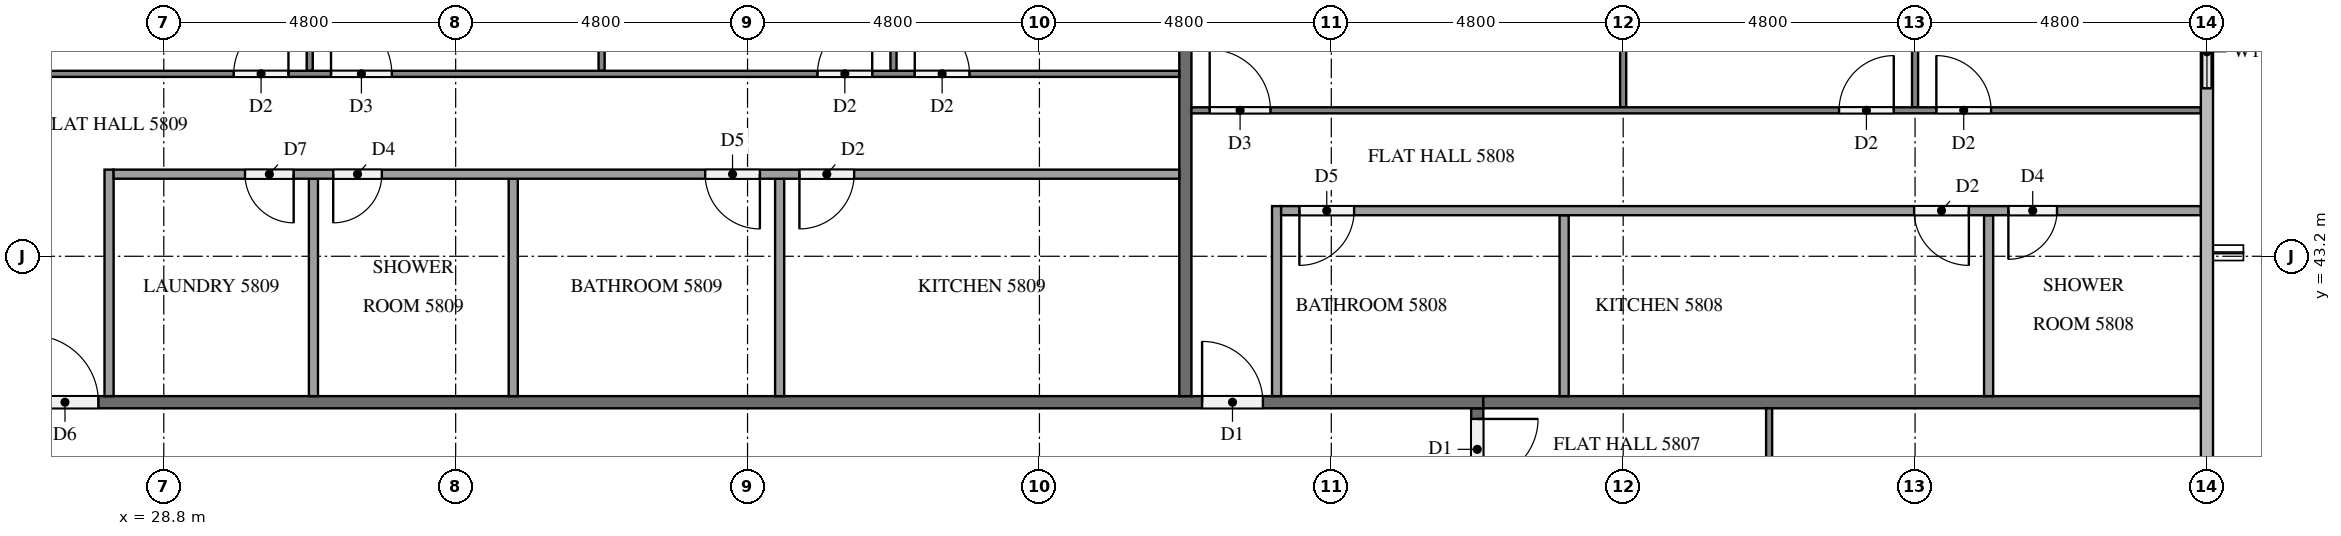
"""IFC4 building model, lengths in metres.
Left out: names, types, materials, properties, quantities, classifications, styles, units other than length and angle.
Written with IfcOpenShell. Run it as: python <this file> out.ifc"""

import sys

from ifc_helpers import new_model, si_unit, direction, frame, frame_2d, origin, place, context, subcontext, project, spatial, rectangle, extrude, element, fill, save


model = new_model("IFC4")
c1 = context("Model", 3, precision=1e-05, world=origin(), true_north=direction((0.0, 1.0)))
c2 = subcontext(c1, "Body", "Model", "MODEL_VIEW")
j1 = project(units=[si_unit("LENGTHUNIT", "METRE"), si_unit("PLANEANGLEUNIT", "RADIAN")], contexts=[c1])
p1 = place(None, origin())
s1 = spatial("IfcSite", under=j1, at=p1, CompositionType="ELEMENT")
p2 = place(p1, origin())
s2 = spatial("IfcBuilding", under=s1, at=p2, CompositionType="ELEMENT")
p3 = place(p2, frame((0.0, 0.0, 222.8)))
s3 = spatial("IfcBuildingStorey", under=s2, at=p3, CompositionType="ELEMENT", Elevation=222.8)
p4 = place(p3, frame((62.4, 45.6, 0.0), z_axis=(0.0, 0.0, 1.0), x_axis=(0.0, 1.0, 0.0)))
e1 = element("IfcWall", 1, at=p4, inside=s3, PredefinedType="SOLIDWALL", context=c2, shape_type="SweptSolid", body=[
    extrude(rectangle(XDim=1.925, YDim=0.15, at=frame_2d((0.962, 0.0))), origin(), (0.0, 0.0, 1.0), 3.2),
])
p5 = place(p4, frame((0.363, 0.0, 0.9)))
e2 = element("IfcOpeningElement", 2, at=p5, cuts=e1, PredefinedType="OPENING", context=c2, shape_type="SweptSolid", body=[
    extrude(rectangle(XDim=1.2, YDim=1.4, at=frame_2d((0.6, 0.7))), frame((0.0, 0.085, 0.0), z_axis=(0.0, -1.0, 0.0), x_axis=(1.0, 0.0, 0.0)), (0.0, 0.0, 1.0), 0.17),
])
p6 = place(p3, frame((50.4, 40.7, 0.0), z_axis=(0.0, 0.0, 1.0), x_axis=(0.0, -1.0, 0.0)))
e3 = element("IfcWall", 3, at=p6, inside=s3, PredefinedType="PARTITIONING", context=c2, shape_type="SweptSolid", body=[
    extrude(rectangle(XDim=28.6, YDim=0.2, at=frame_2d((14.3, 0.0))), origin(), (0.0, 0.0, 1.0), 3.2),
])
p7 = place(p6, frame((21.775, 0.0, 0.0)))
e4 = element("IfcOpeningElement", 4, at=p7, cuts=e3, PredefinedType="OPENING", context=c2, shape_type="SweptSolid", body=[
    extrude(rectangle(XDim=1.0, YDim=2.1, at=frame_2d((0.5, 1.05))), frame((0.0, 0.11, 0.0), z_axis=(0.0, -1.0, 0.0), x_axis=(1.0, 0.0, 0.0)), (0.0, 0.0, 1.0), 0.22),
])
p8 = place(p6, frame((7.375, 0.0, 0.0)))
e5 = element("IfcOpeningElement", 5, at=p8, cuts=e3, PredefinedType="OPENING", context=c2, shape_type="SweptSolid", body=[
    extrude(rectangle(XDim=1.0, YDim=2.1, at=frame_2d((0.5, 1.05))), frame((0.0, 0.11, 0.0), z_axis=(0.0, -1.0, 0.0), x_axis=(1.0, 0.0, 0.0)), (0.0, 0.0, 1.0), 0.22),
])
p9 = place(p6, frame((0.175, 0.0, 0.0)))
e6 = element("IfcOpeningElement", 6, at=p9, cuts=e3, PredefinedType="OPENING", context=c2, shape_type="SweptSolid", body=[
    extrude(rectangle(XDim=1.0, YDim=2.1, at=frame_2d((0.5, 1.05))), frame((0.0, 0.11, 0.0), z_axis=(0.0, -1.0, 0.0), x_axis=(1.0, 0.0, 0.0)), (0.0, 0.0, 1.0), 0.22),
])
p10 = place(p3, frame((11.9, 40.8, 0.0), z_axis=(0.0, 0.0, 1.0), x_axis=(1.0, 0.0, 0.0)))
e7 = element("IfcWall", 7, at=p10, inside=s3, PredefinedType="PARTITIONING", context=c2, shape_type="SweptSolid", body=[
    extrude(rectangle(XDim=38.6, YDim=0.2, at=frame_2d((19.3, 0.0))), origin(), (0.0, 0.0, 1.0), 3.2),
])
p11 = place(p10, frame((33.975, 0.0, 0.0)))
e8 = element("IfcOpeningElement", 8, at=p11, cuts=e7, PredefinedType="OPENING", context=c2, shape_type="SweptSolid", body=[
    extrude(rectangle(XDim=1.0, YDim=2.1, at=frame_2d((0.5, 1.05))), frame((0.0, 0.11, 0.0), z_axis=(0.0, -1.0, 0.0), x_axis=(1.0, 0.0, 0.0)), (0.0, 0.0, 1.0), 0.22),
])
p12 = place(p10, frame((14.725, 0.0, 0.0)))
e9 = element("IfcOpeningElement", 9, at=p12, cuts=e7, PredefinedType="OPENING", context=c2, shape_type="SweptSolid", body=[
    extrude(rectangle(XDim=1.1, YDim=2.1, at=frame_2d((0.55, 1.05))), frame((0.0, 0.11, 0.0), z_axis=(0.0, -1.0, 0.0), x_axis=(1.0, 0.0, 0.0)), (0.0, 0.0, 1.0), 0.22),
])
p13 = place(p10, frame((7.575, 0.0, 0.0)))
e10 = element("IfcOpeningElement", 10, at=p13, cuts=e7, PredefinedType="OPENING", context=c2, shape_type="SweptSolid", body=[
    extrude(rectangle(XDim=1.0, YDim=2.1, at=frame_2d((0.5, 1.05))), frame((0.0, 0.11, 0.0), z_axis=(0.0, -1.0, 0.0), x_axis=(1.0, 0.0, 0.0)), (0.0, 0.0, 1.0), 0.22),
])
p14 = place(p10, frame((6.025, 0.0, 0.0)))
e11 = element("IfcOpeningElement", 11, at=p14, cuts=e7, PredefinedType="OPENING", context=c2, shape_type="SweptSolid", body=[
    extrude(rectangle(XDim=1.0, YDim=2.1, at=frame_2d((0.5, 1.05))), frame((0.0, 0.11, 0.0), z_axis=(0.0, -1.0, 0.0), x_axis=(1.0, 0.0, 0.0)), (0.0, 0.0, 1.0), 0.22),
])
for number, where, z_axis, x_axis in (
    (12, (50.5, 40.8, 0.0), (0.0, 0.0, 1.0), (1.0, 0.0, 0.0)),
    (13, (45.6, 52.7, 0.0), (0.0, 0.0, 1.0), (0.0, -1.0, 0.0)),
):
    element("IfcWall", number, at=place(p3, frame(where, z_axis=z_axis, x_axis=x_axis)), inside=s3, PredefinedType="PARTITIONING", context=c2, shape_type="SweptSolid", body=[
        extrude(rectangle(XDim=11.8, YDim=0.2, at=frame_2d((5.9, 0.0))), origin(), (0.0, 0.0, 1.0), 3.2),
    ])
p15 = place(p3, frame((55.2, 40.7, 0.0), z_axis=(0.0, 0.0, 1.0), x_axis=(0.0, -1.0, 0.0)))
e14 = element("IfcWall", 14, at=p15, inside=s3, PredefinedType="PARTITIONING", context=c2, shape_type="SweptSolid", body=[
    extrude(rectangle(XDim=7.0, YDim=0.1, at=frame_2d((3.5, 0.0))), origin(), (0.0, 0.0, 1.0), 3.2),
])
p16 = place(p15, frame((5.7, 0.0, 0.0)))
e15 = element("IfcOpeningElement", 15, at=p16, cuts=e14, PredefinedType="OPENING", context=c2, shape_type="SweptSolid", body=[
    extrude(rectangle(XDim=1.0, YDim=2.1, at=frame_2d((0.5, 1.05))), frame((0.0, 0.06, 0.0), z_axis=(0.0, -1.0, 0.0), x_axis=(1.0, 0.0, 0.0)), (0.0, 0.0, 1.0), 0.12),
])
p17 = place(p3, frame((52.8, 45.65, 0.0), z_axis=(0.0, 0.0, 1.0), x_axis=(0.0, 1.0, 0.0)))
e16 = element("IfcWall", 16, at=p17, inside=s3, PredefinedType="PARTITIONING", context=c2, shape_type="SweptSolid", body=[
    extrude(rectangle(XDim=7.05, YDim=0.1, at=frame_2d((3.525, 0.0))), origin(), (0.0, 0.0, 1.0), 3.2),
])
p18 = place(p3, frame((57.6, 45.65, 0.0), z_axis=(0.0, 0.0, 1.0), x_axis=(0.0, 1.0, 0.0)))
e17 = element("IfcWall", 17, at=p18, inside=s3, PredefinedType="PARTITIONING", context=c2, shape_type="SweptSolid", body=[
    extrude(rectangle(XDim=6.675, YDim=0.1, at=frame_2d((3.337, 0.0))), origin(), (0.0, 0.0, 1.0), 3.2),
])
p19 = place(p3, frame((45.7, 45.6, 0.0), z_axis=(0.0, 0.0, 1.0), x_axis=(1.0, 0.0, 0.0)))
e18 = element("IfcWall", 18, at=p19, inside=s3, PredefinedType="PARTITIONING", context=c2, shape_type="SweptSolid", body=[
    extrude(rectangle(XDim=16.6, YDim=0.1, at=frame_2d((8.3, 0.0))), origin(), (0.0, 0.0, 1.0), 3.2),
])
p20 = place(p19, frame((0.3, 0.0, 0.0)))
e19 = element("IfcOpeningElement", 19, at=p20, cuts=e18, PredefinedType="OPENING", context=c2, shape_type="SweptSolid", body=[
    extrude(rectangle(XDim=1.0, YDim=2.1, at=frame_2d((0.5, 1.05))), frame((0.0, 0.06, 0.0), z_axis=(0.0, -1.0, 0.0), x_axis=(1.0, 0.0, 0.0)), (0.0, 0.0, 1.0), 0.12),
])
p21 = place(p19, frame((10.65, 0.0, 0.0)))
e20 = element("IfcOpeningElement", 20, at=p21, cuts=e18, PredefinedType="OPENING", context=c2, shape_type="SweptSolid", body=[
    extrude(rectangle(XDim=0.9, YDim=2.1, at=frame_2d((0.45, 1.05))), frame((0.0, 0.06, 0.0), z_axis=(0.0, -1.0, 0.0), x_axis=(1.0, 0.0, 0.0)), (0.0, 0.0, 1.0), 0.12),
])
p22 = place(p19, frame((12.25, 0.0, 0.0)))
e21 = element("IfcOpeningElement", 21, at=p22, cuts=e18, PredefinedType="OPENING", context=c2, shape_type="SweptSolid", body=[
    extrude(rectangle(XDim=0.9, YDim=2.1, at=frame_2d((0.45, 1.05))), frame((0.0, 0.06, 0.0), z_axis=(0.0, -1.0, 0.0), x_axis=(1.0, 0.0, 0.0)), (0.0, 0.0, 1.0), 0.12),
])
for number, where, z_axis, x_axis in (
    (22, (51.829, 40.9, 0.0), (0.0, 0.0, 1.0), (0.0, 1.0, 0.0)),
    (23, (58.81, 40.9, 0.0), (0.0, 0.0, 1.0), (0.0, 1.0, 0.0)),
):
    element("IfcWall", number, at=place(p3, frame(where, z_axis=z_axis, x_axis=x_axis)), inside=s3, PredefinedType="PARTITIONING", context=c2, shape_type="SweptSolid", body=[
        extrude(rectangle(XDim=2.975, YDim=0.15, at=frame_2d((1.488, 0.0))), origin(), (0.0, 0.0, 1.0), 3.2),
    ])
p23 = place(p3, frame((47.1, 40.9, 0.0), z_axis=(0.0, 0.0, 1.0), x_axis=(0.0, 1.0, 0.0)))
e24 = element("IfcWall", 24, at=p23, inside=s3, PredefinedType="PARTITIONING", context=c2, shape_type="SweptSolid", body=[
    extrude(rectangle(XDim=3.125, YDim=0.15, at=frame_2d((1.562, 0.0))), origin(), (0.0, 0.0, 1.0), 3.2),
])
p24 = place(p3, frame((62.3, 43.95, 0.0), z_axis=(0.0, 0.0, 1.0), x_axis=(-1.0, 0.0, 0.0)))
e25 = element("IfcWall", 25, at=p24, inside=s3, PredefinedType="PARTITIONING", context=c2, shape_type="SweptSolid", body=[
    extrude(rectangle(XDim=15.125, YDim=0.15, at=frame_2d((7.562, 0.0))), origin(), (0.0, 0.0, 1.0), 3.2),
])
p25 = place(p24, frame((13.925, 0.0, 0.0)))
e26 = element("IfcOpeningElement", 26, at=p25, cuts=e25, PredefinedType="OPENING", context=c2, shape_type="SweptSolid", body=[
    extrude(rectangle(XDim=0.9, YDim=2.1, at=frame_2d((0.45, 1.05))), frame((0.0, 0.085, 0.0), z_axis=(0.0, -1.0, 0.0), x_axis=(1.0, 0.0, 0.0)), (0.0, 0.0, 1.0), 0.17),
])
p26 = place(p24, frame((3.815, 0.0, 0.0)))
e27 = element("IfcOpeningElement", 27, at=p26, cuts=e25, PredefinedType="OPENING", context=c2, shape_type="SweptSolid", body=[
    extrude(rectangle(XDim=0.9, YDim=2.1, at=frame_2d((0.45, 1.05))), frame((0.0, 0.085, 0.0), z_axis=(0.0, -1.0, 0.0), x_axis=(1.0, 0.0, 0.0)), (0.0, 0.0, 1.0), 0.17),
])
p27 = place(p24, frame((2.365, 0.0, 0.0)))
e28 = element("IfcOpeningElement", 28, at=p27, cuts=e25, PredefinedType="OPENING", context=c2, shape_type="SweptSolid", body=[
    extrude(rectangle(XDim=0.8, YDim=2.1, at=frame_2d((0.4, 1.05))), frame((0.0, 0.085, 0.0), z_axis=(0.0, -1.0, 0.0), x_axis=(1.0, 0.0, 0.0)), (0.0, 0.0, 1.0), 0.17),
])
for number, where, z_axis, x_axis in (
    (29, (31.2, 46.25, 0.0), (0.0, 0.0, 1.0), (0.0, 1.0, 0.0)),
    (30, (36.0, 46.25, 0.0), (0.0, 0.0, 1.0), (0.0, 1.0, 0.0)),
    (31, (40.8, 46.25, 0.0), (0.0, 0.0, 1.0), (0.0, 1.0, 0.0)),
):
    element("IfcWall", number, at=place(p3, frame(where, z_axis=z_axis, x_axis=x_axis)), inside=s3, PredefinedType="PARTITIONING", context=c2, shape_type="SweptSolid", body=[
        extrude(rectangle(XDim=6.45, YDim=0.1, at=frame_2d((3.225, 0.0))), origin(), (0.0, 0.0, 1.0), 3.2),
    ])
p28 = place(p3, frame((26.5, 46.2, 0.0), z_axis=(0.0, 0.0, 1.0), x_axis=(1.0, 0.0, 0.0)))
e32 = element("IfcWall", 32, at=p28, inside=s3, PredefinedType="PARTITIONING", context=c2, shape_type="SweptSolid", body=[
    extrude(rectangle(XDim=19.0, YDim=0.1, at=frame_2d((9.5, 0.0))), origin(), (0.0, 0.0, 1.0), 3.2),
])
p29 = place(p28, frame((3.45, 0.0, 0.0)))
e33 = element("IfcOpeningElement", 33, at=p29, cuts=e32, PredefinedType="OPENING", context=c2, shape_type="SweptSolid", body=[
    extrude(rectangle(XDim=0.9, YDim=2.1, at=frame_2d((0.45, 1.05))), frame((0.0, 0.06, 0.0), z_axis=(0.0, -1.0, 0.0), x_axis=(1.0, 0.0, 0.0)), (0.0, 0.0, 1.0), 0.12),
])
p30 = place(p28, frame((5.05, 0.0, 0.0)))
e34 = element("IfcOpeningElement", 34, at=p30, cuts=e32, PredefinedType="OPENING", context=c2, shape_type="SweptSolid", body=[
    extrude(rectangle(XDim=1.0, YDim=2.1, at=frame_2d((0.5, 1.05))), frame((0.0, 0.06, 0.0), z_axis=(0.0, -1.0, 0.0), x_axis=(1.0, 0.0, 0.0)), (0.0, 0.0, 1.0), 0.12),
])
p31 = place(p28, frame((13.05, 0.0, 0.0)))
e35 = element("IfcOpeningElement", 35, at=p31, cuts=e32, PredefinedType="OPENING", context=c2, shape_type="SweptSolid", body=[
    extrude(rectangle(XDim=0.9, YDim=2.1, at=frame_2d((0.45, 1.05))), frame((0.0, 0.06, 0.0), z_axis=(0.0, -1.0, 0.0), x_axis=(1.0, 0.0, 0.0)), (0.0, 0.0, 1.0), 0.12),
])
p32 = place(p28, frame((14.65, 0.0, 0.0)))
e36 = element("IfcOpeningElement", 36, at=p32, cuts=e32, PredefinedType="OPENING", context=c2, shape_type="SweptSolid", body=[
    extrude(rectangle(XDim=0.9, YDim=2.1, at=frame_2d((0.45, 1.05))), frame((0.0, 0.06, 0.0), z_axis=(0.0, -1.0, 0.0), x_axis=(1.0, 0.0, 0.0)), (0.0, 0.0, 1.0), 0.12),
])
for number, where, z_axis, x_axis in (
    (37, (31.261, 40.9, 0.0), (0.0, 0.0, 1.0), (0.0, 1.0, 0.0)),
    (38, (34.547, 40.9, 0.0), (0.0, 0.0, 1.0), (0.0, 1.0, 0.0)),
    (39, (38.928, 40.9, 0.0), (0.0, 0.0, 1.0), (0.0, 1.0, 0.0)),
):
    element("IfcWall", number, at=place(p3, frame(where, z_axis=z_axis, x_axis=x_axis)), inside=s3, PredefinedType="PARTITIONING", context=c2, shape_type="SweptSolid", body=[
        extrude(rectangle(XDim=3.575, YDim=0.15, at=frame_2d((1.788, 0.0))), origin(), (0.0, 0.0, 1.0), 3.2),
    ])
p33 = place(p3, frame((27.9, 40.9, 0.0), z_axis=(0.0, 0.0, 1.0), x_axis=(0.0, 1.0, 0.0)))
e40 = element("IfcWall", 40, at=p33, inside=s3, PredefinedType="PARTITIONING", context=c2, shape_type="SweptSolid", body=[
    extrude(rectangle(XDim=3.725, YDim=0.15, at=frame_2d((1.863, 0.0))), origin(), (0.0, 0.0, 1.0), 3.2),
])
p34 = place(p3, frame((45.5, 44.55, 0.0), z_axis=(0.0, 0.0, 1.0), x_axis=(-1.0, 0.0, 0.0)))
e41 = element("IfcWall", 41, at=p34, inside=s3, PredefinedType="PARTITIONING", context=c2, shape_type="SweptSolid", body=[
    extrude(rectangle(XDim=17.525, YDim=0.15, at=frame_2d((8.762, 0.0))), origin(), (0.0, 0.0, 1.0), 3.2),
])
p35 = place(p34, frame((14.564, 0.0, 0.0)))
e42 = element("IfcOpeningElement", 42, at=p35, cuts=e41, PredefinedType="OPENING", context=c2, shape_type="SweptSolid", body=[
    extrude(rectangle(XDim=0.8, YDim=2.1, at=frame_2d((0.4, 1.05))), frame((0.0, 0.085, 0.0), z_axis=(0.0, -1.0, 0.0), x_axis=(1.0, 0.0, 0.0)), (0.0, 0.0, 1.0), 0.17),
])
p36 = place(p34, frame((13.114, 0.0, 0.0)))
e43 = element("IfcOpeningElement", 43, at=p36, cuts=e41, PredefinedType="OPENING", context=c2, shape_type="SweptSolid", body=[
    extrude(rectangle(XDim=0.8, YDim=2.1, at=frame_2d((0.4, 1.05))), frame((0.0, 0.085, 0.0), z_axis=(0.0, -1.0, 0.0), x_axis=(1.0, 0.0, 0.0)), (0.0, 0.0, 1.0), 0.17),
])
p37 = place(p34, frame((6.897, 0.0, 0.0)))
e44 = element("IfcOpeningElement", 44, at=p37, cuts=e41, PredefinedType="OPENING", context=c2, shape_type="SweptSolid", body=[
    extrude(rectangle(XDim=0.9, YDim=2.1, at=frame_2d((0.45, 1.05))), frame((0.0, 0.085, 0.0), z_axis=(0.0, -1.0, 0.0), x_axis=(1.0, 0.0, 0.0)), (0.0, 0.0, 1.0), 0.17),
])
p38 = place(p34, frame((5.347, 0.0, 0.0)))
e45 = element("IfcOpeningElement", 45, at=p38, cuts=e41, PredefinedType="OPENING", context=c2, shape_type="SweptSolid", body=[
    extrude(rectangle(XDim=0.9, YDim=2.1, at=frame_2d((0.45, 1.05))), frame((0.0, 0.085, 0.0), z_axis=(0.0, -1.0, 0.0), x_axis=(1.0, 0.0, 0.0)), (0.0, 0.0, 1.0), 0.17),
])
p39 = place(p5, origin())
e46 = element("IfcWindow", 46, at=p39, inside=s3, PartitioningType="SINGLE_PANEL", PredefinedType="WINDOW", context=c2, shape_type="SweptSolid", body=[
    extrude(rectangle(XDim=1.2, YDim=1.4, at=frame_2d((0.6, 0.7))), frame((0.0, 0.03, 0.0), z_axis=(0.0, -1.0, 0.0), x_axis=(1.0, 0.0, 0.0)), (0.0, 0.0, 1.0), 0.06),
])
fill(e2, e46)
p40 = place(p9, origin())
e47 = element("IfcDoor", 47, at=p40, inside=s3, OperationType="SINGLE_SWING_LEFT", PredefinedType="DOOR", context=c2, shape_type="SweptSolid", body=[
    extrude(rectangle(XDim=1.0, YDim=2.1, at=frame_2d((0.5, 1.05))), frame((0.0, 0.025, 0.0), z_axis=(0.0, -1.0, 0.0), x_axis=(1.0, 0.0, 0.0)), (0.0, 0.0, 1.0), 0.05),
])
fill(e6, e47)
p41 = place(p11, origin())
e48 = element("IfcDoor", 48, at=p41, inside=s3, OperationType="SINGLE_SWING_LEFT", PredefinedType="DOOR", context=c2, shape_type="SweptSolid", body=[
    extrude(rectangle(XDim=1.0, YDim=2.1, at=frame_2d((0.5, 1.05))), frame((0.0, 0.025, 0.0), z_axis=(0.0, -1.0, 0.0), x_axis=(1.0, 0.0, 0.0)), (0.0, 0.0, 1.0), 0.05),
])
fill(e8, e48)
p42 = place(p12, origin())
e49 = element("IfcDoor", 49, at=p42, inside=s3, OperationType="SINGLE_SWING_LEFT", PredefinedType="DOOR", context=c2, shape_type="SweptSolid", body=[
    extrude(rectangle(XDim=1.1, YDim=2.1, at=frame_2d((0.55, 1.05))), frame((0.0, 0.025, 0.0), z_axis=(0.0, -1.0, 0.0), x_axis=(1.0, 0.0, 0.0)), (0.0, 0.0, 1.0), 0.05),
])
fill(e9, e49)
p43 = place(p20, origin())
e50 = element("IfcDoor", 50, at=p43, inside=s3, OperationType="SINGLE_SWING_LEFT", PredefinedType="DOOR", context=c2, shape_type="SweptSolid", body=[
    extrude(rectangle(XDim=1.0, YDim=2.1, at=frame_2d((0.5, 1.05))), frame((0.0, 0.025, 0.0), z_axis=(0.0, -1.0, 0.0), x_axis=(1.0, 0.0, 0.0)), (0.0, 0.0, 1.0), 0.05),
])
fill(e19, e50)
p44 = place(p21, origin())
e51 = element("IfcDoor", 51, at=p44, inside=s3, OperationType="SINGLE_SWING_RIGHT", PredefinedType="DOOR", context=c2, shape_type="SweptSolid", body=[
    extrude(rectangle(XDim=0.9, YDim=2.1, at=frame_2d((0.45, 1.05))), frame((0.0, 0.025, 0.0), z_axis=(0.0, -1.0, 0.0), x_axis=(1.0, 0.0, 0.0)), (0.0, 0.0, 1.0), 0.05),
])
fill(e20, e51)
p45 = place(p22, origin())
e52 = element("IfcDoor", 52, at=p45, inside=s3, OperationType="SINGLE_SWING_LEFT", PredefinedType="DOOR", context=c2, shape_type="SweptSolid", body=[
    extrude(rectangle(XDim=0.9, YDim=2.1, at=frame_2d((0.45, 1.05))), frame((0.0, 0.025, 0.0), z_axis=(0.0, -1.0, 0.0), x_axis=(1.0, 0.0, 0.0)), (0.0, 0.0, 1.0), 0.05),
])
fill(e21, e52)
p46 = place(p25, origin())
e53 = element("IfcDoor", 53, at=p46, inside=s3, OperationType="SINGLE_SWING_RIGHT", PredefinedType="DOOR", context=c2, shape_type="SweptSolid", body=[
    extrude(rectangle(XDim=0.9, YDim=2.1, at=frame_2d((0.45, 1.05))), frame((0.0, 0.025, 0.0), z_axis=(0.0, -1.0, 0.0), x_axis=(1.0, 0.0, 0.0)), (0.0, 0.0, 1.0), 0.05),
])
fill(e26, e53)
p47 = place(p26, origin())
e54 = element("IfcDoor", 54, at=p47, inside=s3, OperationType="SINGLE_SWING_LEFT", PredefinedType="DOOR", context=c2, shape_type="SweptSolid", body=[
    extrude(rectangle(XDim=0.9, YDim=2.1, at=frame_2d((0.45, 1.05))), frame((0.0, 0.025, 0.0), z_axis=(0.0, -1.0, 0.0), x_axis=(1.0, 0.0, 0.0)), (0.0, 0.0, 1.0), 0.05),
])
fill(e27, e54)
p48 = place(p27, origin())
e55 = element("IfcDoor", 55, at=p48, inside=s3, OperationType="SINGLE_SWING_RIGHT", PredefinedType="DOOR", context=c2, shape_type="SweptSolid", body=[
    extrude(rectangle(XDim=0.8, YDim=2.1, at=frame_2d((0.4, 1.05))), frame((0.0, 0.025, 0.0), z_axis=(0.0, -1.0, 0.0), x_axis=(1.0, 0.0, 0.0)), (0.0, 0.0, 1.0), 0.05),
])
fill(e28, e55)
p49 = place(p29, origin())
e56 = element("IfcDoor", 56, at=p49, inside=s3, OperationType="SINGLE_SWING_RIGHT", PredefinedType="DOOR", context=c2, shape_type="SweptSolid", body=[
    extrude(rectangle(XDim=0.9, YDim=2.1, at=frame_2d((0.45, 1.05))), frame((0.0, 0.025, 0.0), z_axis=(0.0, -1.0, 0.0), x_axis=(1.0, 0.0, 0.0)), (0.0, 0.0, 1.0), 0.05),
])
fill(e33, e56)
p50 = place(p30, origin())
e57 = element("IfcDoor", 57, at=p50, inside=s3, OperationType="SINGLE_SWING_LEFT", PredefinedType="DOOR", context=c2, shape_type="SweptSolid", body=[
    extrude(rectangle(XDim=1.0, YDim=2.1, at=frame_2d((0.5, 1.05))), frame((0.0, 0.025, 0.0), z_axis=(0.0, -1.0, 0.0), x_axis=(1.0, 0.0, 0.0)), (0.0, 0.0, 1.0), 0.05),
])
fill(e34, e57)
p51 = place(p31, origin())
e58 = element("IfcDoor", 58, at=p51, inside=s3, OperationType="SINGLE_SWING_RIGHT", PredefinedType="DOOR", context=c2, shape_type="SweptSolid", body=[
    extrude(rectangle(XDim=0.9, YDim=2.1, at=frame_2d((0.45, 1.05))), frame((0.0, 0.025, 0.0), z_axis=(0.0, -1.0, 0.0), x_axis=(1.0, 0.0, 0.0)), (0.0, 0.0, 1.0), 0.05),
])
fill(e35, e58)
p52 = place(p32, origin())
e59 = element("IfcDoor", 59, at=p52, inside=s3, OperationType="SINGLE_SWING_LEFT", PredefinedType="DOOR", context=c2, shape_type="SweptSolid", body=[
    extrude(rectangle(XDim=0.9, YDim=2.1, at=frame_2d((0.45, 1.05))), frame((0.0, 0.025, 0.0), z_axis=(0.0, -1.0, 0.0), x_axis=(1.0, 0.0, 0.0)), (0.0, 0.0, 1.0), 0.05),
])
fill(e36, e59)
p53 = place(p35, origin())
e60 = element("IfcDoor", 60, at=p53, inside=s3, OperationType="SINGLE_SWING_LEFT", PredefinedType="DOOR", context=c2, shape_type="SweptSolid", body=[
    extrude(rectangle(XDim=0.8, YDim=2.1, at=frame_2d((0.4, 1.05))), frame((0.0, 0.025, 0.0), z_axis=(0.0, -1.0, 0.0), x_axis=(1.0, 0.0, 0.0)), (0.0, 0.0, 1.0), 0.05),
])
fill(e42, e60)
p54 = place(p36, origin())
e61 = element("IfcDoor", 61, at=p54, inside=s3, OperationType="SINGLE_SWING_RIGHT", PredefinedType="DOOR", context=c2, shape_type="SweptSolid", body=[
    extrude(rectangle(XDim=0.8, YDim=2.1, at=frame_2d((0.4, 1.05))), frame((0.0, 0.025, 0.0), z_axis=(0.0, -1.0, 0.0), x_axis=(1.0, 0.0, 0.0)), (0.0, 0.0, 1.0), 0.05),
])
fill(e43, e61)
p55 = place(p37, origin())
e62 = element("IfcDoor", 62, at=p55, inside=s3, OperationType="SINGLE_SWING_LEFT", PredefinedType="DOOR", context=c2, shape_type="SweptSolid", body=[
    extrude(rectangle(XDim=0.9, YDim=2.1, at=frame_2d((0.45, 1.05))), frame((0.0, 0.025, 0.0), z_axis=(0.0, -1.0, 0.0), x_axis=(1.0, 0.0, 0.0)), (0.0, 0.0, 1.0), 0.05),
])
fill(e44, e62)
p56 = place(p38, origin())
e63 = element("IfcDoor", 63, at=p56, inside=s3, OperationType="SINGLE_SWING_RIGHT", PredefinedType="DOOR", context=c2, shape_type="SweptSolid", body=[
    extrude(rectangle(XDim=0.9, YDim=2.1, at=frame_2d((0.45, 1.05))), frame((0.0, 0.025, 0.0), z_axis=(0.0, -1.0, 0.0), x_axis=(1.0, 0.0, 0.0)), (0.0, 0.0, 1.0), 0.05),
])
fill(e45, e63)
save(model, sys.argv[1])
